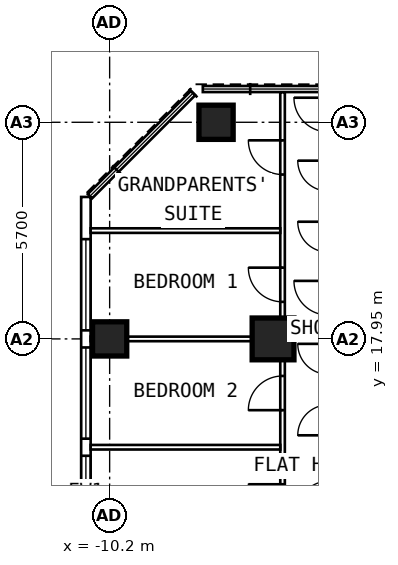
"""IFC4 building model, lengths in metres.
Left out: names, types, materials, properties, quantities, classifications, styles, units other than length and angle.
Written with IfcOpenShell. Run it as: python <this file> out.ifc"""

import sys

from ifc_helpers import new_model, si_unit, direction, frame, frame_2d, origin, origin_2d, place, context, subcontext, project, spatial, rectangle, extrude, element, fill, save


model = new_model("IFC4")
c1 = context("Model", 3, precision=1e-05, world=origin(), true_north=direction((0.0, 1.0)))
c2 = subcontext(c1, "Body", "Model", "MODEL_VIEW")
j1 = project(units=[si_unit("LENGTHUNIT", "METRE"), si_unit("PLANEANGLEUNIT", "RADIAN")], contexts=[c1])
p1 = place(None, origin())
s1 = spatial("IfcSite", under=j1, at=p1, CompositionType="ELEMENT")
p2 = place(p1, origin())
s2 = spatial("IfcBuilding", under=s1, at=p2, CompositionType="ELEMENT")
p3 = place(p2, frame((0.0, 0.0, 215.4)))
s3 = spatial("IfcBuildingStorey", under=s2, at=p3, CompositionType="ELEMENT", Elevation=215.4)
for number, where, z_axis, x_axis in (
    (1, (-10.2, 17.95, 0.0), (0.0, 0.0, 1.0), (0.0, 1.0, 0.0)),
    (2, (-7.4, 23.65, 0.0), (0.0, 0.0, 1.0), (0.0, 1.0, 0.0)),
):
    element("IfcColumn", number, at=place(p3, frame(where, z_axis=z_axis, x_axis=x_axis)), inside=s3, PredefinedType="COLUMN", context=c2, shape_type="SweptSolid", body=[
        extrude(rectangle(XDim=0.9, YDim=0.9, at=origin_2d()), origin(), (0.0, 0.0, 1.0), 3.6),
    ])
p4 = place(p3, frame((-5.9, 17.95, 0.0), z_axis=(0.0, 0.0, 1.0), x_axis=(0.0, 1.0, 0.0)))
e3 = element("IfcColumn", 3, at=p4, inside=s3, PredefinedType="COLUMN", context=c2, shape_type="SweptSolid", body=[
    extrude(rectangle(XDim=1.1, YDim=1.1, at=origin_2d()), origin(), (0.0, 0.0, 1.0), 3.6),
])
p5 = place(p3, frame((-10.825, 6.148, 0.0), z_axis=(0.0, 0.0, 1.0), x_axis=(0.0, 1.0, 0.0)))
e4 = element("IfcWall", 4, at=p5, inside=s3, PredefinedType="SOLIDWALL", context=c2, shape_type="SweptSolid", body=[
    extrude(rectangle(XDim=15.537, YDim=0.25, at=frame_2d((7.769, 0.0))), origin(), (0.0, 0.0, 1.0), 3.35),
])
p6 = place(p5, frame((0.627, 0.0, 0.8)))
e5 = element("IfcOpeningElement", 5, at=p6, cuts=e4, PredefinedType="OPENING", context=c2, shape_type="SweptSolid", body=[
    extrude(rectangle(XDim=2.4, YDim=1.8, at=frame_2d((1.2, 0.9))), frame((0.0, 0.137, 0.0), z_axis=(0.0, -1.0, 0.0), x_axis=(1.0, 0.0, 0.0)), (0.0, 0.0, 1.0), 0.274),
])
p7 = place(p5, frame((3.477, 0.0, 0.8)))
e6 = element("IfcOpeningElement", 6, at=p7, cuts=e4, PredefinedType="OPENING", context=c2, shape_type="SweptSolid", body=[
    extrude(rectangle(XDim=2.4, YDim=1.8, at=frame_2d((1.2, 0.9))), frame((0.0, 0.137, 0.0), z_axis=(0.0, -1.0, 0.0), x_axis=(1.0, 0.0, 0.0)), (0.0, 0.0, 1.0), 0.274),
])
p8 = place(p5, frame((6.327, 0.0, 0.8)))
e7 = element("IfcOpeningElement", 7, at=p8, cuts=e4, PredefinedType="OPENING", context=c2, shape_type="SweptSolid", body=[
    extrude(rectangle(XDim=2.4, YDim=1.8, at=frame_2d((1.2, 0.9))), frame((0.0, 0.137, 0.0), z_axis=(0.0, -1.0, 0.0), x_axis=(1.0, 0.0, 0.0)), (0.0, 0.0, 1.0), 0.274),
])
p9 = place(p5, frame((9.177, 0.0, 0.8)))
e8 = element("IfcOpeningElement", 8, at=p9, cuts=e4, PredefinedType="OPENING", context=c2, shape_type="SweptSolid", body=[
    extrude(rectangle(XDim=2.4, YDim=1.8, at=frame_2d((1.2, 0.9))), frame((0.0, 0.137, 0.0), z_axis=(0.0, -1.0, 0.0), x_axis=(1.0, 0.0, 0.0)), (0.0, 0.0, 1.0), 0.274),
])
p10 = place(p5, frame((12.027, 0.0, 0.8)))
e9 = element("IfcOpeningElement", 9, at=p10, cuts=e4, PredefinedType="OPENING", context=c2, shape_type="SweptSolid", body=[
    extrude(rectangle(XDim=2.4, YDim=1.8, at=frame_2d((1.2, 0.9))), frame((0.0, 0.137, 0.0), z_axis=(0.0, -1.0, 0.0), x_axis=(1.0, 0.0, 0.0)), (0.0, 0.0, 1.0), 0.274),
])
p11 = place(p3, frame((-5.65, 9.6, 0.0), z_axis=(0.0, 0.0, 1.0), x_axis=(0.0, 1.0, 0.0)))
e10 = element("IfcWall", 10, at=p11, inside=s3, PredefinedType="PARTITIONING", context=c2, shape_type="SweptSolid", body=[
    extrude(rectangle(XDim=14.845, YDim=0.12, at=frame_2d((7.422, 0.0))), origin(), (0.0, 0.0, 1.0), 3.35),
])
p12 = place(p11, frame((1.05, 0.0, 0.0)))
e11 = element("IfcOpeningElement", 11, at=p12, cuts=e10, PredefinedType="OPENING", context=c2, shape_type="SweptSolid", body=[
    extrude(rectangle(XDim=0.9, YDim=2.1, at=frame_2d((0.45, 1.05))), frame((0.0, 0.072, 0.0), z_axis=(0.0, -1.0, 0.0), x_axis=(1.0, 0.0, 0.0)), (0.0, 0.0, 1.0), 0.144),
])
p13 = place(p11, frame((3.625, 0.0, 0.0)))
e12 = element("IfcOpeningElement", 12, at=p13, cuts=e10, PredefinedType="OPENING", context=c2, shape_type="SweptSolid", body=[
    extrude(rectangle(XDim=0.9, YDim=2.1, at=frame_2d((0.45, 1.05))), frame((0.0, 0.072, 0.0), z_axis=(0.0, -1.0, 0.0), x_axis=(1.0, 0.0, 0.0)), (0.0, 0.0, 1.0), 0.144),
])
p14 = place(p11, frame((6.475, 0.0, 0.0)))
e13 = element("IfcOpeningElement", 13, at=p14, cuts=e10, PredefinedType="OPENING", context=c2, shape_type="SweptSolid", body=[
    extrude(rectangle(XDim=0.9, YDim=2.1, at=frame_2d((0.45, 1.05))), frame((0.0, 0.072, 0.0), z_axis=(0.0, -1.0, 0.0), x_axis=(1.0, 0.0, 0.0)), (0.0, 0.0, 1.0), 0.144),
])
p15 = place(p11, frame((9.325, 0.0, 0.0)))
e14 = element("IfcOpeningElement", 14, at=p15, cuts=e10, PredefinedType="OPENING", context=c2, shape_type="SweptSolid", body=[
    extrude(rectangle(XDim=0.9, YDim=2.1, at=frame_2d((0.45, 1.05))), frame((0.0, 0.072, 0.0), z_axis=(0.0, -1.0, 0.0), x_axis=(1.0, 0.0, 0.0)), (0.0, 0.0, 1.0), 0.144),
])
p16 = place(p11, frame((12.675, 0.0, 0.0)))
e15 = element("IfcOpeningElement", 15, at=p16, cuts=e10, PredefinedType="OPENING", context=c2, shape_type="SweptSolid", body=[
    extrude(rectangle(XDim=0.9, YDim=2.1, at=frame_2d((0.45, 1.05))), frame((0.0, 0.072, 0.0), z_axis=(0.0, -1.0, 0.0), x_axis=(1.0, 0.0, 0.0)), (0.0, 0.0, 1.0), 0.144),
])
p17 = place(p3, frame((-5.71, 15.1, 0.0), z_axis=(0.0, 0.0, 1.0), x_axis=(-1.0, 0.0, 0.0)))
e16 = element("IfcWall", 16, at=p17, inside=s3, PredefinedType="PARTITIONING", context=c2, shape_type="SweptSolid", body=[
    extrude(rectangle(XDim=4.99, YDim=0.12, at=frame_2d((2.495, 0.0))), origin(), (0.0, 0.0, 1.0), 3.35),
])
p18 = place(p3, frame((-5.71, 17.95, 0.0), z_axis=(0.0, 0.0, 1.0), x_axis=(-1.0, 0.0, 0.0)))
e17 = element("IfcWall", 17, at=p18, inside=s3, PredefinedType="PARTITIONING", context=c2, shape_type="SweptSolid", body=[
    extrude(rectangle(XDim=4.99, YDim=0.12, at=frame_2d((2.495, 0.0))), origin(), (0.0, 0.0, 1.0), 2.45),
])
p19 = place(p3, frame((-5.71, 20.8, 0.0), z_axis=(0.0, 0.0, 1.0), x_axis=(-1.0, 0.0, 0.0)))
e18 = element("IfcWall", 18, at=p19, inside=s3, PredefinedType="PARTITIONING", context=c2, shape_type="SweptSolid", body=[
    extrude(rectangle(XDim=4.99, YDim=0.12, at=frame_2d((2.495, 0.0))), origin(), (0.0, 0.0, 1.0), 3.35),
])
p20 = place(p8, origin())
e19 = element("IfcWindow", 19, at=p20, inside=s3, PartitioningType="SINGLE_PANEL", PredefinedType="WINDOW", context=c2, shape_type="SweptSolid", body=[
    extrude(rectangle(XDim=2.4, YDim=1.8, at=frame_2d((1.2, 0.9))), frame((0.0, 0.03, 0.0), z_axis=(0.0, -1.0, 0.0), x_axis=(1.0, 0.0, 0.0)), (0.0, 0.0, 1.0), 0.06),
])
fill(e7, e19)
p21 = place(p9, origin())
e20 = element("IfcWindow", 20, at=p21, inside=s3, PartitioningType="SINGLE_PANEL", PredefinedType="WINDOW", context=c2, shape_type="SweptSolid", body=[
    extrude(rectangle(XDim=2.4, YDim=1.8, at=frame_2d((1.2, 0.9))), frame((0.0, 0.03, 0.0), z_axis=(0.0, -1.0, 0.0), x_axis=(1.0, 0.0, 0.0)), (0.0, 0.0, 1.0), 0.06),
])
fill(e8, e20)
p22 = place(p10, origin())
e21 = element("IfcWindow", 21, at=p22, inside=s3, PartitioningType="SINGLE_PANEL", PredefinedType="WINDOW", context=c2, shape_type="SweptSolid", body=[
    extrude(rectangle(XDim=2.4, YDim=1.8, at=frame_2d((1.2, 0.9))), frame((0.0, 0.03, 0.0), z_axis=(0.0, -1.0, 0.0), x_axis=(1.0, 0.0, 0.0)), (0.0, 0.0, 1.0), 0.06),
])
fill(e9, e21)
p23 = place(p13, origin())
e22 = element("IfcDoor", 22, at=p23, inside=s3, OperationType="SINGLE_SWING_RIGHT", PredefinedType="DOOR", context=c2, shape_type="SweptSolid", body=[
    extrude(rectangle(XDim=0.9, YDim=2.1, at=frame_2d((0.45, 1.05))), frame((0.0, 0.025, 0.0), z_axis=(0.0, -1.0, 0.0), x_axis=(1.0, 0.0, 0.0)), (0.0, 0.0, 1.0), 0.05),
])
fill(e12, e22)
p24 = place(p14, origin())
e23 = element("IfcDoor", 23, at=p24, inside=s3, OperationType="SINGLE_SWING_LEFT", PredefinedType="DOOR", context=c2, shape_type="SweptSolid", body=[
    extrude(rectangle(XDim=0.9, YDim=2.1, at=frame_2d((0.45, 1.05))), frame((0.0, 0.025, 0.0), z_axis=(0.0, -1.0, 0.0), x_axis=(1.0, 0.0, 0.0)), (0.0, 0.0, 1.0), 0.05),
])
fill(e13, e23)
p25 = place(p15, origin())
e24 = element("IfcDoor", 24, at=p25, inside=s3, OperationType="SINGLE_SWING_RIGHT", PredefinedType="DOOR", context=c2, shape_type="SweptSolid", body=[
    extrude(rectangle(XDim=0.9, YDim=2.1, at=frame_2d((0.45, 1.05))), frame((0.0, 0.025, 0.0), z_axis=(0.0, -1.0, 0.0), x_axis=(1.0, 0.0, 0.0)), (0.0, 0.0, 1.0), 0.05),
])
fill(e14, e24)
p26 = place(p16, origin())
e25 = element("IfcDoor", 25, at=p26, inside=s3, OperationType="SINGLE_SWING_RIGHT", PredefinedType="DOOR", context=c2, shape_type="SweptSolid", body=[
    extrude(rectangle(XDim=0.9, YDim=2.1, at=frame_2d((0.45, 1.05))), frame((0.0, 0.025, 0.0), z_axis=(0.0, -1.0, 0.0), x_axis=(1.0, 0.0, 0.0)), (0.0, 0.0, 1.0), 0.05),
])
fill(e15, e25)
save(model, sys.argv[1])
